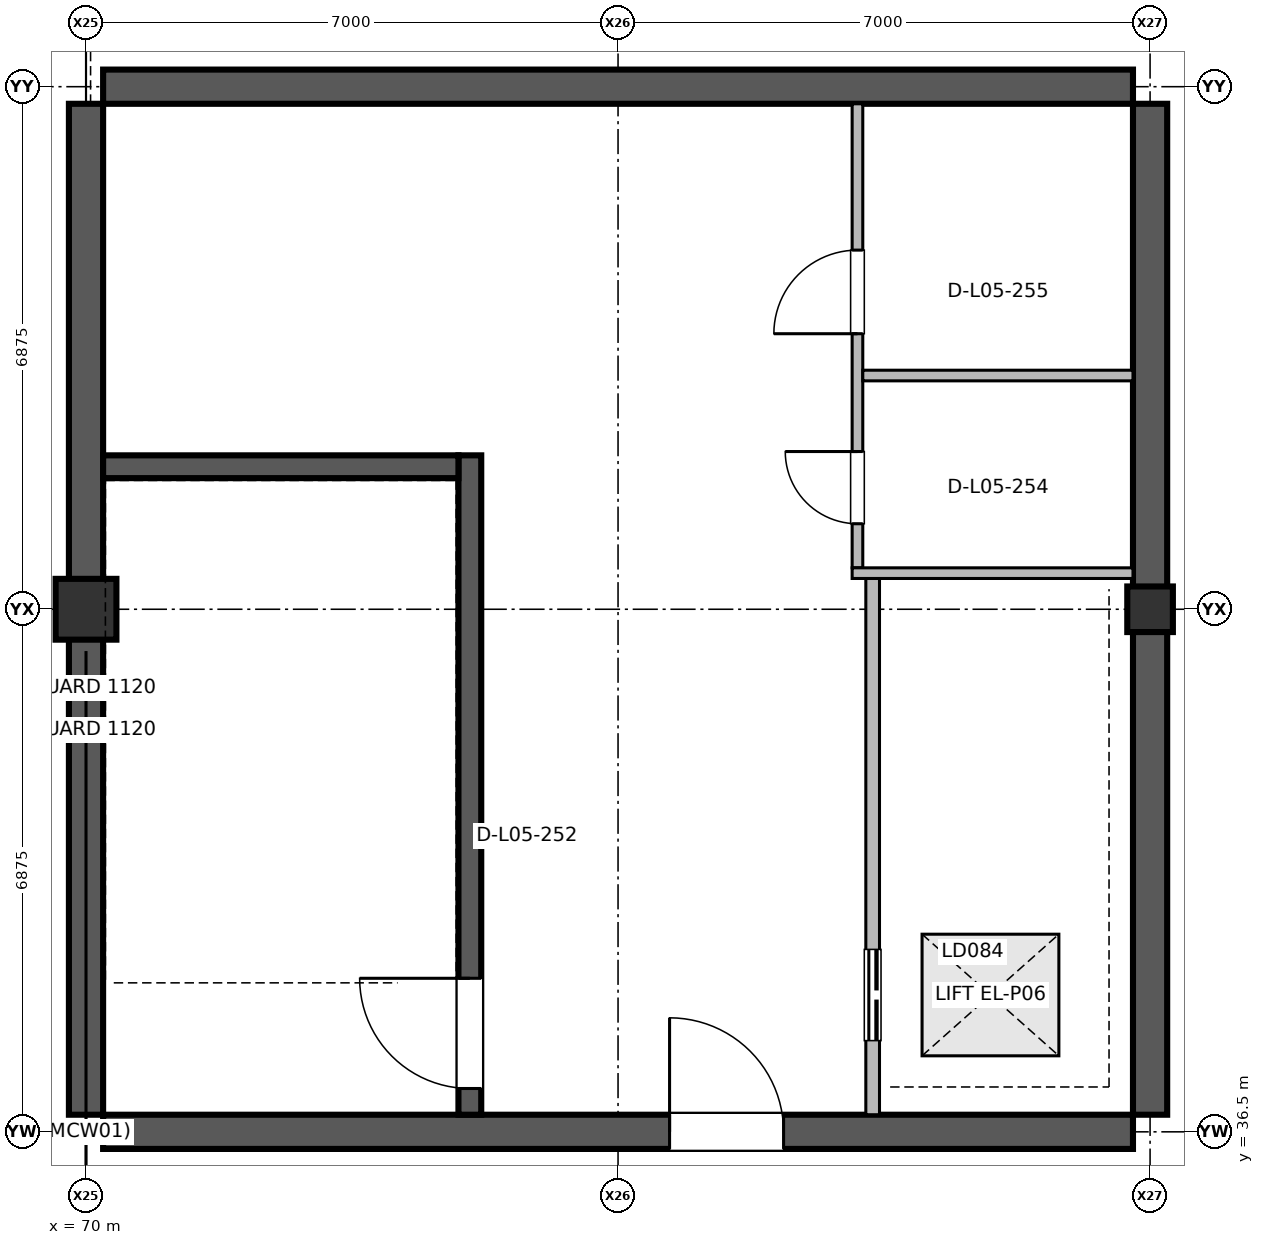
"""IFC4 building model, lengths in metres.
Left out: names, types, materials, properties, quantities, classifications, styles, units other than length and angle.
Written with IfcOpenShell. Run it as: python <this file> out.ifc"""

import sys

from ifc_helpers import new_model, si_unit, direction, frame, frame_2d, origin, origin_2d, place, context, subcontext, project, spatial, rectangle, extrude, element, fill, save


model = new_model("IFC4")
c1 = context("Model", 3, precision=1e-05, world=origin(), true_north=direction((0.0, 1.0)))
c2 = subcontext(c1, "Body", "Model", "MODEL_VIEW")
j1 = project(units=[si_unit("LENGTHUNIT", "METRE"), si_unit("PLANEANGLEUNIT", "RADIAN")], contexts=[c1])
p1 = place(None, origin())
s1 = spatial("IfcSite", under=j1, at=p1, CompositionType="ELEMENT")
p2 = place(p1, origin())
s2 = spatial("IfcBuilding", under=s1, at=p2, CompositionType="ELEMENT")
p3 = place(p2, frame((0.0, 0.0, 21.0)))
s3 = spatial("IfcBuildingStorey", under=s2, at=p3, CompositionType="ELEMENT", Elevation=21.0)
p4 = place(p3, frame((70.0, 43.375, 0.0), z_axis=(0.0, 0.0, 1.0), x_axis=(1.0, 0.0, 0.0)))
e1 = element("IfcColumn", 1, at=p4, inside=s3, PredefinedType="COLUMN", context=c2, shape_type="SweptSolid", body=[
    extrude(rectangle(XDim=0.8, YDim=0.8, at=origin_2d()), origin(), (0.0, 0.0, 1.0), 5.185),
])
p5 = place(p3, frame((84.0, 43.375, 0.0), z_axis=(0.0, 0.0, 1.0), x_axis=(1.0, 0.0, 0.0)))
e2 = element("IfcColumn", 2, at=p5, inside=s3, PredefinedType="COLUMN", context=c2, shape_type="SweptSolid", body=[
    extrude(rectangle(XDim=0.6, YDim=0.6, at=origin_2d()), origin(), (0.0, 0.0, 1.0), 5.185),
])
for number, where, z_axis, x_axis in (
    (3, (70.0, 36.725, 0.0), (0.0, 0.0, 1.0), (0.0, 1.0, 0.0)),
    (4, (84.0, 36.725, 0.0), (0.0, 0.0, 1.0), (0.0, 1.0, 0.0)),
):
    element("IfcWall", number, at=place(p3, frame(where, z_axis=z_axis, x_axis=x_axis)), inside=s3, PredefinedType="SHEAR", context=c2, shape_type="SweptSolid", body=[
        extrude(rectangle(XDim=13.3, YDim=0.45, at=frame_2d((6.65, 0.0))), origin(), (0.0, 0.0, 1.0), 5.185),
    ])
p6 = place(p3, frame((70.225, 36.5, 0.0), z_axis=(0.0, 0.0, 1.0), x_axis=(1.0, 0.0, 0.0)))
e5 = element("IfcWall", 5, at=p6, inside=s3, PredefinedType="SHEAR", context=c2, shape_type="SweptSolid", body=[
    extrude(rectangle(XDim=13.55, YDim=0.45, at=frame_2d((6.775, 0.0))), origin(), (0.0, 0.0, 1.0), 5.185),
])
p7 = place(p6, frame((7.453, 0.0, 0.0)))
e6 = element("IfcOpeningElement", 6, at=p7, cuts=e5, PredefinedType="OPENING", context=c2, shape_type="SweptSolid", body=[
    extrude(rectangle(XDim=1.5, YDim=2.2, at=frame_2d((0.75, 1.1))), frame((0.0, 0.235, 0.0), z_axis=(0.0, -1.0, 0.0), x_axis=(1.0, 0.0, 0.0)), (0.0, 0.0, 1.0), 0.47),
])
p8 = place(p3, frame((70.225, 50.25, 0.0), z_axis=(0.0, 0.0, 1.0), x_axis=(1.0, 0.0, 0.0)))
e7 = element("IfcWall", 7, at=p8, inside=s3, PredefinedType="SHEAR", context=c2, shape_type="SweptSolid", body=[
    extrude(rectangle(XDim=13.55, YDim=0.45, at=frame_2d((6.775, 0.0))), origin(), (0.0, 0.0, 1.0), 5.185),
])
p9 = place(p3, frame((75.05, 36.725, 0.0), z_axis=(0.0, 0.0, 1.0), x_axis=(0.0, 1.0, 0.0)))
e8 = element("IfcWall", 8, at=p9, inside=s3, PredefinedType="SHEAR", context=c2, shape_type="SweptSolid", body=[
    extrude(rectangle(XDim=8.675, YDim=0.3, at=frame_2d((4.337, 0.0))), origin(), (0.0, 0.0, 1.0), 5.185),
])
p10 = place(p9, frame((0.345, 0.0, 0.0)))
e9 = element("IfcOpeningElement", 9, at=p10, cuts=e8, PredefinedType="OPENING", context=c2, shape_type="SweptSolid", body=[
    extrude(rectangle(XDim=1.45, YDim=2.2, at=frame_2d((0.725, 1.1))), frame((0.0, 0.16, 0.0), z_axis=(0.0, -1.0, 0.0), x_axis=(1.0, 0.0, 0.0)), (0.0, 0.0, 1.0), 0.32),
])
p11 = place(p3, frame((80.35, 36.725, 0.0), z_axis=(0.0, 0.0, 1.0), x_axis=(0.0, 1.0, 0.0)))
e10 = element("IfcWall", 10, at=p11, inside=s3, PredefinedType="PARTITIONING", context=c2, shape_type="SweptSolid", body=[
    extrude(rectangle(XDim=7.055, YDim=0.18, at=frame_2d((3.527, 0.0))), origin(), (0.0, 0.0, 1.0), 4.42),
])
p12 = place(p11, frame((0.975, 0.0, 0.0)))
e11 = element("IfcOpeningElement", 11, at=p12, cuts=e10, PredefinedType="OPENING", context=c2, shape_type="SweptSolid", body=[
    extrude(rectangle(XDim=1.2, YDim=2.25, at=frame_2d((0.6, 1.125))), frame((0.0, 0.1, 0.0), z_axis=(0.0, -1.0, 0.0), x_axis=(1.0, 0.0, 0.0)), (0.0, 0.0, 1.0), 0.2),
])
p13 = place(p3, frame((80.15, 43.92, 0.0), z_axis=(0.0, 0.0, 1.0), x_axis=(0.0, 1.0, 0.0)))
e12 = element("IfcWall", 12, at=p13, inside=s3, PredefinedType="PARTITIONING", context=c2, shape_type="SweptSolid", body=[
    extrude(rectangle(XDim=6.105, YDim=0.14, at=frame_2d((3.052, 0.0))), origin(), (0.0, 0.0, 1.0), 4.42),
])
p14 = place(p13, frame((0.58, 0.0, 0.0)))
e13 = element("IfcOpeningElement", 13, at=p14, cuts=e12, PredefinedType="OPENING", context=c2, shape_type="SweptSolid", body=[
    extrude(rectangle(XDim=0.95, YDim=2.15, at=frame_2d((0.475, 1.075))), frame((0.0, 0.08, 0.0), z_axis=(0.0, -1.0, 0.0), x_axis=(1.0, 0.0, 0.0)), (0.0, 0.0, 1.0), 0.16),
])
p15 = place(p13, frame((3.08, 0.0, 0.0)))
e14 = element("IfcOpeningElement", 14, at=p15, cuts=e12, PredefinedType="OPENING", context=c2, shape_type="SweptSolid", body=[
    extrude(rectangle(XDim=1.1, YDim=2.15, at=frame_2d((0.55, 1.075))), frame((0.0, 0.08, 0.0), z_axis=(0.0, -1.0, 0.0), x_axis=(1.0, 0.0, 0.0)), (0.0, 0.0, 1.0), 0.16),
])
p16 = place(p3, frame((80.08, 43.85, 0.0), z_axis=(0.0, 0.0, 1.0), x_axis=(1.0, 0.0, 0.0)))
e15 = element("IfcWall", 15, at=p16, inside=s3, PredefinedType="PARTITIONING", context=c2, shape_type="SweptSolid", body=[
    extrude(rectangle(XDim=3.695, YDim=0.14, at=frame_2d((1.847, 0.0))), origin(), (0.0, 0.0, 1.0), 4.42),
])
p17 = place(p3, frame((80.22, 46.45, 0.0), z_axis=(0.0, 0.0, 1.0), x_axis=(1.0, 0.0, 0.0)))
e16 = element("IfcWall", 16, at=p17, inside=s3, PredefinedType="PARTITIONING", context=c2, shape_type="SweptSolid", body=[
    extrude(rectangle(XDim=3.555, YDim=0.14, at=frame_2d((1.777, 0.0))), origin(), (0.0, 0.0, 1.0), 4.42),
])
p18 = place(p3, frame((70.225, 45.25, 0.0), z_axis=(0.0, 0.0, 1.0), x_axis=(1.0, 0.0, 0.0)))
e17 = element("IfcWall", 17, at=p18, inside=s3, PredefinedType="SHEAR", context=c2, shape_type="SweptSolid", body=[
    extrude(rectangle(XDim=4.675, YDim=0.3, at=frame_2d((2.337, 0.0))), origin(), (0.0, 0.0, 1.0), 5.185),
])
p19 = place(p7, origin())
e18 = element("IfcDoor", 18, at=p19, inside=s3, OperationType="SINGLE_SWING_LEFT", PredefinedType="DOOR", context=c2, shape_type="SweptSolid", body=[
    extrude(rectangle(XDim=1.5, YDim=2.2, at=frame_2d((0.75, 1.1))), frame((0.0, 0.025, 0.0), z_axis=(0.0, -1.0, 0.0), x_axis=(1.0, 0.0, 0.0)), (0.0, 0.0, 1.0), 0.05),
])
fill(e6, e18)
p20 = place(p10, origin())
e19 = element("IfcDoor", 19, at=p20, inside=s3, OperationType="SINGLE_SWING_RIGHT", PredefinedType="DOOR", context=c2, shape_type="SweptSolid", body=[
    extrude(rectangle(XDim=1.45, YDim=2.2, at=frame_2d((0.725, 1.1))), frame((0.0, 0.025, 0.0), z_axis=(0.0, -1.0, 0.0), x_axis=(1.0, 0.0, 0.0)), (0.0, 0.0, 1.0), 0.05),
])
fill(e9, e19)
p21 = place(p12, origin())
e20 = element("IfcDoor", 20, at=p21, inside=s3, OperationType="DOUBLE_DOOR_SLIDING", PredefinedType="DOOR", context=c2, shape_type="SweptSolid", body=[
    extrude(rectangle(XDim=1.2, YDim=2.25, at=frame_2d((0.6, 1.125))), frame((0.0, 0.025, 0.0), z_axis=(0.0, -1.0, 0.0), x_axis=(1.0, 0.0, 0.0)), (0.0, 0.0, 1.0), 0.05),
])
fill(e11, e20)
p22 = place(p14, origin())
e21 = element("IfcDoor", 21, at=p22, inside=s3, OperationType="SINGLE_SWING_RIGHT", PredefinedType="DOOR", context=c2, shape_type="SweptSolid", body=[
    extrude(rectangle(XDim=0.95, YDim=2.15, at=frame_2d((0.475, 1.075))), frame((0.0, 0.025, 0.0), z_axis=(0.0, -1.0, 0.0), x_axis=(1.0, 0.0, 0.0)), (0.0, 0.0, 1.0), 0.05),
])
fill(e13, e21)
p23 = place(p15, origin())
e22 = element("IfcDoor", 22, at=p23, inside=s3, OperationType="SINGLE_SWING_LEFT", PredefinedType="DOOR", context=c2, shape_type="SweptSolid", body=[
    extrude(rectangle(XDim=1.1, YDim=2.15, at=frame_2d((0.55, 1.075))), frame((0.0, 0.025, 0.0), z_axis=(0.0, -1.0, 0.0), x_axis=(1.0, 0.0, 0.0)), (0.0, 0.0, 1.0), 0.05),
])
fill(e14, e22)
save(model, sys.argv[1])
